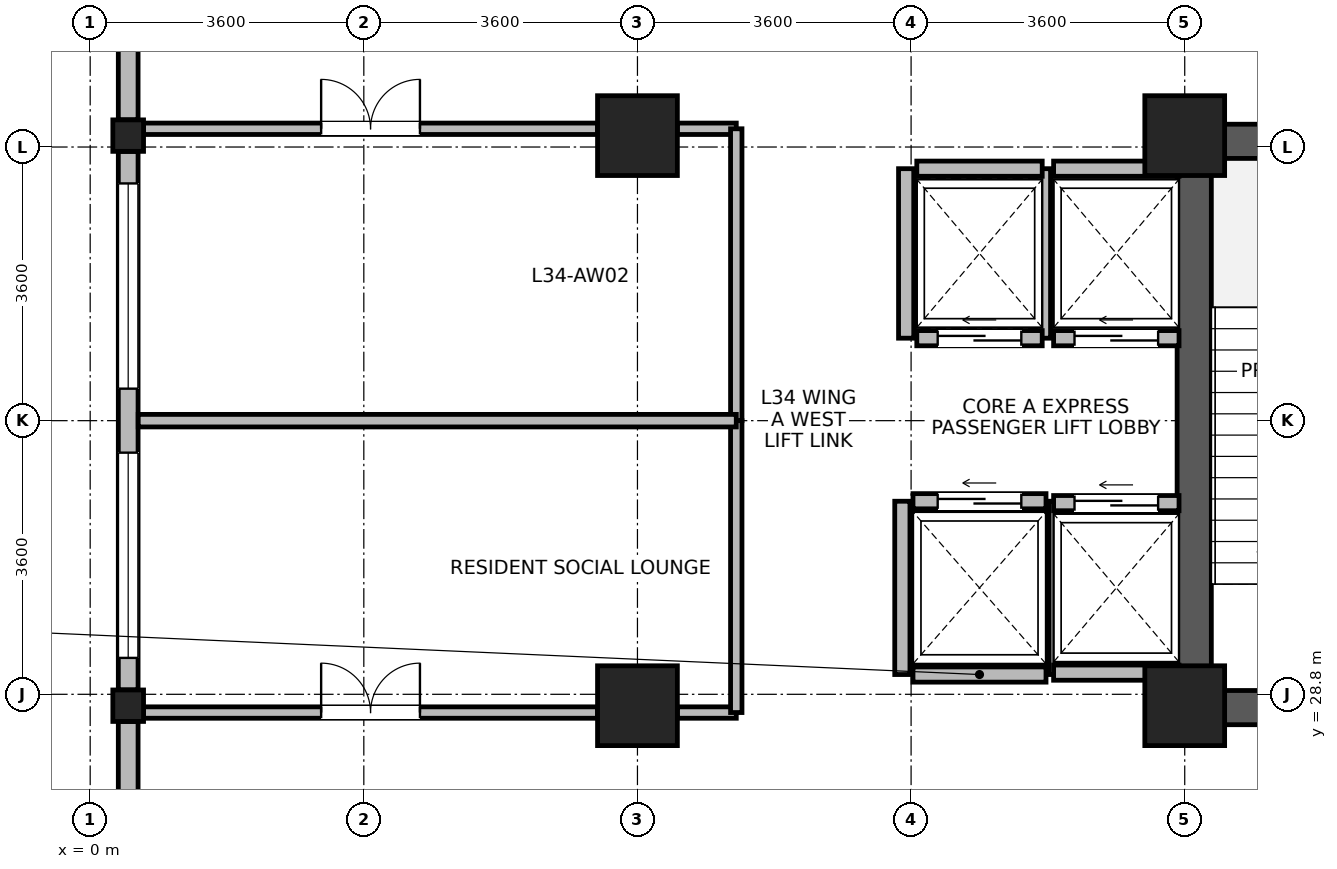
"""IFC4 building model, lengths in metres.
Left out: names, types, materials, properties, quantities, classifications, styles, units other than length and angle.
Written with IfcOpenShell. Run it as: python <this file> out.ifc"""

import sys

from ifc_helpers import new_model, si_unit, direction, frame, frame_2d, origin, origin_2d, place, context, subcontext, project, spatial, rectangle, i_section, extrude, source, transform, mapped, element, fill, save


model = new_model("IFC4")
c1 = context("Model", 3, precision=1e-05, world=origin(), true_north=direction((0.0, 1.0)))
c2 = subcontext(c1, "Body", "Model", "MODEL_VIEW")
j1 = project(units=[si_unit("LENGTHUNIT", "METRE"), si_unit("PLANEANGLEUNIT", "RADIAN")], contexts=[c1])
p1 = place(None, origin())
s1 = spatial("IfcSite", under=j1, at=p1, CompositionType="ELEMENT")
p2 = place(p1, origin())
s2 = spatial("IfcBuilding", under=s1, at=p2, CompositionType="ELEMENT")
p3 = place(p2, frame((0.0, 0.0, 135.6)))
s3 = spatial("IfcBuildingStorey", under=s2, at=p3, CompositionType="ELEMENT", Elevation=135.6)
p4 = place(p3, frame((14.525, 28.4, 0.0), z_axis=(0.0, 0.0, 1.0), x_axis=(0.0, 1.0, 0.0)))
e1 = element("IfcWall", 1, at=p4, inside=s3, PredefinedType="SHEAR", context=c2, shape_type="SweptSolid", body=[
    extrude(rectangle(XDim=7.9, YDim=0.45, at=frame_2d((3.95, 0.0))), origin(), (0.0, 0.0, 1.0), 4.36),
])
for number, where, z_axis, x_axis in (
    (2, (14.75, 28.625, 0.0), (0.0, 0.0, 1.0), (1.0, 0.0, 0.0)),
    (3, (14.75, 36.075, 0.0), (0.0, 0.0, 1.0), (1.0, 0.0, 0.0)),
):
    element("IfcWall", number, at=place(p3, frame(where, z_axis=z_axis, x_axis=x_axis)), inside=s3, PredefinedType="SHEAR", context=c2, shape_type="SweptSolid", body=[
        extrude(rectangle(XDim=3.2, YDim=0.45, at=frame_2d((1.6, 0.0))), origin(), (0.0, 0.0, 1.0), 4.36),
    ])
m1 = source(origin(), c2, "Body", "SweptSolid", [
    extrude(rectangle(XDim=1.05, YDim=1.05, at=origin_2d()), origin(), (0.0, 0.0, 1.0), 4.6),
])
for number, where, z_axis, x_axis in (
    (4, (7.2, 28.65, 0.0), (0.0, 0.0, 1.0), (1.0, 0.0, 0.0)),
    (5, (7.2, 36.15, 0.0), (0.0, 0.0, 1.0), (1.0, 0.0, 0.0)),
    (6, (14.4, 28.65, 0.0), (0.0, 0.0, 1.0), (1.0, 0.0, 0.0)),
    (7, (14.4, 36.15, 0.0), (0.0, 0.0, 1.0), (1.0, 0.0, 0.0)),
):
    element("IfcColumn", number, at=place(p3, frame(where, z_axis=z_axis, x_axis=x_axis)), inside=s3, PredefinedType="COLUMN", context=c2, shape_type="MappedRepresentation", body=[
        mapped(m1, transform((0.0, 0.0, 0.0), x_axis=(1.0, 0.0, 0.0), y_axis=(0.0, 1.0, 0.0), z_axis=(0.0, 0.0, 1.0), scale=1.0)),
    ])
m2 = source(origin(), c2, "Body", "SweptSolid", [
    extrude(i_section(OverallWidth=0.404, OverallDepth=0.414, WebThickness=0.021, FlangeThickness=0.028, FilletRadius=0.015, at=origin_2d()), origin(), (0.0, 0.0, 1.0), 4.6),
])
for number, where, z_axis, x_axis in (
    (8, (0.5, 28.65, 0.0), (0.0, 0.0, 1.0), (1.0, 0.0, 0.0)),
    (9, (0.5, 36.15, 0.0), (0.0, 0.0, 1.0), (1.0, 0.0, 0.0)),
):
    element("IfcColumn", number, at=place(p3, frame(where, z_axis=z_axis, x_axis=x_axis)), inside=s3, PredefinedType="COLUMN", context=c2, shape_type="MappedRepresentation", body=[
        mapped(m2, transform((0.0, 0.0, 0.0), x_axis=(1.0, 0.0, 0.0), y_axis=(0.0, 1.0, 0.0), z_axis=(0.0, 0.0, 1.0), scale=1.0)),
    ])
p5 = place(p3, frame((0.5, 36.358, 0.0), z_axis=(0.0, 0.0, 1.0), x_axis=(0.0, 1.0, 0.0)))
e10 = element("IfcWall", 10, at=p5, inside=s3, PredefinedType="STANDARD", context=c2, shape_type="SweptSolid", body=[
    extrude(rectangle(XDim=6.972, YDim=0.26, at=frame_2d((3.486, 0.0))), origin(), (0.0, 0.0, 1.0), 4.34),
])
p6 = place(p5, frame((3.879, 0.0, 0.85)))
e11 = element("IfcOpeningElement", 11, at=p6, cuts=e10, PredefinedType="OPENING", context=c2, shape_type="SweptSolid", body=[
    extrude(rectangle(XDim=2.7, YDim=2.05, at=frame_2d((1.35, 1.025))), frame((0.0, 0.14, 0.0), z_axis=(0.0, -1.0, 0.0), x_axis=(1.0, 0.0, 0.0)), (0.0, 0.0, 1.0), 0.28),
])
p7 = place(p5, frame((2.453, 0.0, 0.85)))
e12 = element("IfcOpeningElement", 12, at=p7, cuts=e10, PredefinedType="OPENING", context=c2, shape_type="SweptSolid", body=[
    extrude(rectangle(XDim=0.95, YDim=1.75, at=frame_2d((0.475, 0.875))), frame((0.0, 0.14, 0.0), z_axis=(0.0, -1.0, 0.0), x_axis=(1.0, 0.0, 0.0)), (0.0, 0.0, 1.0), 0.28),
])
p8 = place(p3, frame((0.5, 28.858, 0.0), z_axis=(0.0, 0.0, 1.0), x_axis=(0.0, 1.0, 0.0)))
e13 = element("IfcWall", 13, at=p8, inside=s3, PredefinedType="STANDARD", context=c2, shape_type="SweptSolid", body=[
    extrude(rectangle(XDim=7.084, YDim=0.26, at=frame_2d((3.542, 0.0))), origin(), (0.0, 0.0, 1.0), 3.89),
])
p9 = place(p8, frame((0.421, 0.0, 0.85)))
e14 = element("IfcOpeningElement", 14, at=p9, cuts=e13, PredefinedType="OPENING", context=c2, shape_type="SweptSolid", body=[
    extrude(rectangle(XDim=2.7, YDim=2.05, at=frame_2d((1.35, 1.025))), frame((0.0, 0.14, 0.0), z_axis=(0.0, -1.0, 0.0), x_axis=(1.0, 0.0, 0.0)), (0.0, 0.0, 1.0), 0.28),
])
p10 = place(p8, frame((3.963, 0.0, 0.85)))
e15 = element("IfcOpeningElement", 15, at=p10, cuts=e13, PredefinedType="OPENING", context=c2, shape_type="SweptSolid", body=[
    extrude(rectangle(XDim=2.7, YDim=2.05, at=frame_2d((1.35, 1.025))), frame((0.0, 0.14, 0.0), z_axis=(0.0, -1.0, 0.0), x_axis=(1.0, 0.0, 0.0)), (0.0, 0.0, 1.0), 0.28),
])
p11 = place(p3, frame((0.5, 21.47, 0.0), z_axis=(0.0, 0.0, 1.0), x_axis=(0.0, 1.0, 0.0)))
e16 = element("IfcWall", 16, at=p11, inside=s3, PredefinedType="STANDARD", context=c2, shape_type="SweptSolid", body=[
    extrude(rectangle(XDim=6.972, YDim=0.26, at=frame_2d((3.486, 0.0))), origin(), (0.0, 0.0, 1.0), 4.34),
])
p12 = place(p11, frame((0.393, 0.0, 0.85)))
e17 = element("IfcOpeningElement", 17, at=p12, cuts=e16, PredefinedType="OPENING", context=c2, shape_type="SweptSolid", body=[
    extrude(rectangle(XDim=2.7, YDim=2.05, at=frame_2d((1.35, 1.025))), frame((0.0, 0.14, 0.0), z_axis=(0.0, -1.0, 0.0), x_axis=(1.0, 0.0, 0.0)), (0.0, 0.0, 1.0), 0.28),
])
p13 = place(p11, frame((3.569, 0.0, 0.85)))
e18 = element("IfcOpeningElement", 18, at=p13, cuts=e16, PredefinedType="OPENING", context=c2, shape_type="SweptSolid", body=[
    extrude(rectangle(XDim=0.95, YDim=1.75, at=frame_2d((0.475, 0.875))), frame((0.0, 0.14, 0.0), z_axis=(0.0, -1.0, 0.0), x_axis=(1.0, 0.0, 0.0)), (0.0, 0.0, 1.0), 0.28),
])
p14 = place(p3, frame((10.825, 29.06, 0.0), z_axis=(0.0, 0.0, 1.0), x_axis=(1.0, 0.0, 0.0)))
e19 = element("IfcWall", 19, at=p14, inside=s3, PredefinedType="PARTITIONING", context=c2, shape_type="SweptSolid", body=[
    extrude(rectangle(XDim=1.75, YDim=0.2, at=frame_2d((0.875, 0.0))), origin(), (0.0, 0.0, 1.0), 4.34),
])
p15 = place(p3, frame((10.825, 31.34, 0.0), z_axis=(0.0, 0.0, 1.0), x_axis=(1.0, 0.0, 0.0)))
e20 = element("IfcWall", 20, at=p15, inside=s3, PredefinedType="PARTITIONING", context=c2, shape_type="SweptSolid", body=[
    extrude(rectangle(XDim=1.75, YDim=0.2, at=frame_2d((0.875, 0.0))), origin(), (0.0, 0.0, 1.0), 4.34),
])
p16 = place(p15, frame((0.325, 0.0, 0.0)))
e21 = element("IfcOpeningElement", 21, at=p16, cuts=e20, PredefinedType="OPENING", context=c2, shape_type="SweptSolid", body=[
    extrude(rectangle(XDim=1.1, YDim=2.12, at=frame_2d((0.55, 1.06))), frame((0.0, 0.11, 0.0), z_axis=(0.0, -1.0, 0.0), x_axis=(1.0, 0.0, 0.0)), (0.0, 0.0, 1.0), 0.22),
])
for number, where, z_axis, x_axis in (
    (22, (10.685, 29.06, 0.0), (0.0, 0.0, 1.0), (0.0, 1.0, 0.0)),
    (23, (12.715, 29.06, 0.0), (0.0, 0.0, 1.0), (0.0, 1.0, 0.0)),
):
    element("IfcWall", number, at=place(p3, frame(where, z_axis=z_axis, x_axis=x_axis)), inside=s3, PredefinedType="PARTITIONING", context=c2, shape_type="SweptSolid", body=[
        extrude(rectangle(XDim=2.28, YDim=0.2, at=frame_2d((1.14, 0.0))), origin(), (0.0, 0.0, 1.0), 4.34),
    ])
p17 = place(p3, frame((12.675, 33.485, 0.0), z_axis=(0.0, 0.0, 1.0), x_axis=(1.0, 0.0, 0.0)))
e24 = element("IfcWall", 24, at=p17, inside=s3, PredefinedType="PARTITIONING", context=c2, shape_type="SweptSolid", body=[
    extrude(rectangle(XDim=1.65, YDim=0.2, at=frame_2d((0.825, 0.0))), origin(), (0.0, 0.0, 1.0), 4.34),
])
p18 = place(p17, frame((0.275, 0.0, 0.0)))
e25 = element("IfcOpeningElement", 25, at=p18, cuts=e24, PredefinedType="OPENING", context=c2, shape_type="SweptSolid", body=[
    extrude(rectangle(XDim=1.1, YDim=2.12, at=frame_2d((0.55, 1.06))), frame((0.0, 0.11, 0.0), z_axis=(0.0, -1.0, 0.0), x_axis=(1.0, 0.0, 0.0)), (0.0, 0.0, 1.0), 0.22),
])
p19 = place(p3, frame((12.675, 35.715, 0.0), z_axis=(0.0, 0.0, 1.0), x_axis=(1.0, 0.0, 0.0)))
e26 = element("IfcWall", 26, at=p19, inside=s3, PredefinedType="PARTITIONING", context=c2, shape_type="SweptSolid", body=[
    extrude(rectangle(XDim=1.65, YDim=0.2, at=frame_2d((0.825, 0.0))), origin(), (0.0, 0.0, 1.0), 4.34),
])
p20 = place(p3, frame((12.535, 33.485, 0.0), z_axis=(0.0, 0.0, 1.0), x_axis=(0.0, 1.0, 0.0)))
e27 = element("IfcWall", 27, at=p20, inside=s3, PredefinedType="PARTITIONING", context=c2, shape_type="SweptSolid", body=[
    extrude(rectangle(XDim=2.23, YDim=0.2, at=frame_2d((1.115, 0.0))), origin(), (0.0, 0.0, 1.0), 4.34),
])
p21 = place(p3, frame((12.675, 29.085, 0.0), z_axis=(0.0, 0.0, 1.0), x_axis=(1.0, 0.0, 0.0)))
e28 = element("IfcWall", 28, at=p21, inside=s3, PredefinedType="PARTITIONING", context=c2, shape_type="SweptSolid", body=[
    extrude(rectangle(XDim=1.65, YDim=0.2, at=frame_2d((0.825, 0.0))), origin(), (0.0, 0.0, 1.0), 4.34),
])
p22 = place(p3, frame((12.675, 31.315, 0.0), z_axis=(0.0, 0.0, 1.0), x_axis=(1.0, 0.0, 0.0)))
e29 = element("IfcWall", 29, at=p22, inside=s3, PredefinedType="PARTITIONING", context=c2, shape_type="SweptSolid", body=[
    extrude(rectangle(XDim=1.65, YDim=0.2, at=frame_2d((0.825, 0.0))), origin(), (0.0, 0.0, 1.0), 4.34),
])
p23 = place(p22, frame((0.275, 0.0, 0.0)))
e30 = element("IfcOpeningElement", 30, at=p23, cuts=e29, PredefinedType="OPENING", context=c2, shape_type="SweptSolid", body=[
    extrude(rectangle(XDim=1.1, YDim=2.12, at=frame_2d((0.55, 1.06))), frame((0.0, 0.11, 0.0), z_axis=(0.0, -1.0, 0.0), x_axis=(1.0, 0.0, 0.0)), (0.0, 0.0, 1.0), 0.22),
])
p24 = place(p3, frame((10.875, 33.485, 0.0), z_axis=(0.0, 0.0, 1.0), x_axis=(1.0, 0.0, 0.0)))
e31 = element("IfcWall", 31, at=p24, inside=s3, PredefinedType="PARTITIONING", context=c2, shape_type="SweptSolid", body=[
    extrude(rectangle(XDim=1.65, YDim=0.2, at=frame_2d((0.825, 0.0))), origin(), (0.0, 0.0, 1.0), 4.34),
])
p25 = place(p24, frame((0.275, 0.0, 0.0)))
e32 = element("IfcOpeningElement", 32, at=p25, cuts=e31, PredefinedType="OPENING", context=c2, shape_type="SweptSolid", body=[
    extrude(rectangle(XDim=1.1, YDim=2.12, at=frame_2d((0.55, 1.06))), frame((0.0, 0.11, 0.0), z_axis=(0.0, -1.0, 0.0), x_axis=(1.0, 0.0, 0.0)), (0.0, 0.0, 1.0), 0.22),
])
p26 = place(p3, frame((10.875, 35.715, 0.0), z_axis=(0.0, 0.0, 1.0), x_axis=(1.0, 0.0, 0.0)))
e33 = element("IfcWall", 33, at=p26, inside=s3, PredefinedType="PARTITIONING", context=c2, shape_type="SweptSolid", body=[
    extrude(rectangle(XDim=1.65, YDim=0.2, at=frame_2d((0.825, 0.0))), origin(), (0.0, 0.0, 1.0), 4.34),
])
p27 = place(p3, frame((10.735, 33.485, 0.0), z_axis=(0.0, 0.0, 1.0), x_axis=(0.0, 1.0, 0.0)))
e34 = element("IfcWall", 34, at=p27, inside=s3, PredefinedType="PARTITIONING", context=c2, shape_type="SweptSolid", body=[
    extrude(rectangle(XDim=2.23, YDim=0.2, at=frame_2d((1.115, 0.0))), origin(), (0.0, 0.0, 1.0), 4.34),
])
p28 = place(p3, frame((0.702, 28.56, 0.0), z_axis=(0.0, 0.0, 1.0), x_axis=(1.0, 0.0, 0.0)))
e35 = element("IfcWall", 35, at=p28, inside=s3, PredefinedType="PARTITIONING", context=c2, shape_type="SweptSolid", body=[
    extrude(rectangle(XDim=5.973, YDim=0.15, at=frame_2d((2.987, 0.0))), origin(), (0.0, 0.0, 1.0), 3.74),
])
p29 = place(p28, frame((2.336, 0.0, 0.0)))
e36 = element("IfcOpeningElement", 36, at=p29, cuts=e35, PredefinedType="OPENING", context=c2, shape_type="SweptSolid", body=[
    extrude(rectangle(XDim=1.3, YDim=2.12, at=frame_2d((0.65, 1.06))), frame((0.0, 0.085, 0.0), z_axis=(0.0, -1.0, 0.0), x_axis=(1.0, 0.0, 0.0)), (0.0, 0.0, 1.0), 0.17),
])
p30 = place(p3, frame((7.725, 28.56, 0.0), z_axis=(0.0, 0.0, 1.0), x_axis=(1.0, 0.0, 0.0)))
e37 = element("IfcWall", 37, at=p30, inside=s3, PredefinedType="PARTITIONING", context=c2, shape_type="SweptSolid", body=[
    extrude(rectangle(XDim=0.775, YDim=0.15, at=frame_2d((0.387, 0.0))), origin(), (0.0, 0.0, 1.0), 3.74),
])
p31 = place(p3, frame((0.702, 36.24, 0.0), z_axis=(0.0, 0.0, 1.0), x_axis=(1.0, 0.0, 0.0)))
e38 = element("IfcWall", 38, at=p31, inside=s3, PredefinedType="PARTITIONING", context=c2, shape_type="SweptSolid", body=[
    extrude(rectangle(XDim=5.973, YDim=0.15, at=frame_2d((2.987, 0.0))), origin(), (0.0, 0.0, 1.0), 3.74),
])
p32 = place(p31, frame((2.336, 0.0, 0.0)))
e39 = element("IfcOpeningElement", 39, at=p32, cuts=e38, PredefinedType="OPENING", context=c2, shape_type="SweptSolid", body=[
    extrude(rectangle(XDim=1.3, YDim=2.12, at=frame_2d((0.65, 1.06))), frame((0.0, 0.085, 0.0), z_axis=(0.0, -1.0, 0.0), x_axis=(1.0, 0.0, 0.0)), (0.0, 0.0, 1.0), 0.17),
])
p33 = place(p3, frame((7.725, 36.24, 0.0), z_axis=(0.0, 0.0, 1.0), x_axis=(1.0, 0.0, 0.0)))
e40 = element("IfcWall", 40, at=p33, inside=s3, PredefinedType="PARTITIONING", context=c2, shape_type="SweptSolid", body=[
    extrude(rectangle(XDim=0.775, YDim=0.15, at=frame_2d((0.387, 0.0))), origin(), (0.0, 0.0, 1.0), 3.74),
])
p34 = place(p3, frame((8.5, 32.4, 0.0), z_axis=(0.0, 0.0, 1.0), x_axis=(0.0, 1.0, 0.0)))
e41 = element("IfcWall", 41, at=p34, inside=s3, PredefinedType="PARTITIONING", context=c2, shape_type="SweptSolid", body=[
    extrude(rectangle(XDim=3.84, YDim=0.15, at=frame_2d((1.92, 0.0))), origin(), (0.0, 0.0, 1.0), 4.34),
])
p35 = place(p3, frame((8.5, 28.56, 0.0), z_axis=(0.0, 0.0, 1.0), x_axis=(0.0, 1.0, 0.0)))
e42 = element("IfcWall", 42, at=p35, inside=s3, PredefinedType="PARTITIONING", context=c2, shape_type="SweptSolid", body=[
    extrude(rectangle(XDim=3.84, YDim=0.15, at=frame_2d((1.92, 0.0))), origin(), (0.0, 0.0, 1.0), 4.34),
])
p36 = place(p3, frame((0.632, 32.4, 0.0), z_axis=(0.0, 0.0, 1.0), x_axis=(1.0, 0.0, 0.0)))
e43 = element("IfcWall", 43, at=p36, inside=s3, PredefinedType="PARTITIONING", context=c2, shape_type="SweptSolid", body=[
    extrude(rectangle(XDim=7.868, YDim=0.165, at=frame_2d((3.934, 0.0))), origin(), (0.0, 0.0, 1.0), 4.34),
])
p37 = place(p9, origin())
e44 = element("IfcWindow", 44, at=p37, inside=s3, PartitioningType="SINGLE_PANEL", PredefinedType="WINDOW", context=c2, shape_type="SweptSolid", body=[
    extrude(rectangle(XDim=2.7, YDim=2.05, at=frame_2d((1.35, 1.025))), frame((0.0, 0.03, 0.0), z_axis=(0.0, -1.0, 0.0), x_axis=(1.0, 0.0, 0.0)), (0.0, 0.0, 1.0), 0.06),
])
fill(e14, e44)
p38 = place(p10, origin())
e45 = element("IfcWindow", 45, at=p38, inside=s3, PartitioningType="SINGLE_PANEL", PredefinedType="WINDOW", context=c2, shape_type="SweptSolid", body=[
    extrude(rectangle(XDim=2.7, YDim=2.05, at=frame_2d((1.35, 1.025))), frame((0.0, 0.03, 0.0), z_axis=(0.0, -1.0, 0.0), x_axis=(1.0, 0.0, 0.0)), (0.0, 0.0, 1.0), 0.06),
])
fill(e15, e45)
p39 = place(p16, origin())
e46 = element("IfcDoor", 46, at=p39, inside=s3, OperationType="SLIDING_TO_LEFT", PredefinedType="DOOR", context=c2, shape_type="SweptSolid", body=[
    extrude(rectangle(XDim=1.1, YDim=2.12, at=frame_2d((0.55, 1.06))), frame((0.0, 0.025, 0.0), z_axis=(0.0, -1.0, 0.0), x_axis=(1.0, 0.0, 0.0)), (0.0, 0.0, 1.0), 0.05),
])
fill(e21, e46)
p40 = place(p18, origin())
e47 = element("IfcDoor", 47, at=p40, inside=s3, OperationType="SLIDING_TO_LEFT", PredefinedType="DOOR", context=c2, shape_type="SweptSolid", body=[
    extrude(rectangle(XDim=1.1, YDim=2.12, at=frame_2d((0.55, 1.06))), frame((0.0, 0.025, 0.0), z_axis=(0.0, -1.0, 0.0), x_axis=(1.0, 0.0, 0.0)), (0.0, 0.0, 1.0), 0.05),
])
fill(e25, e47)
p41 = place(p23, origin())
e48 = element("IfcDoor", 48, at=p41, inside=s3, OperationType="SLIDING_TO_LEFT", PredefinedType="DOOR", context=c2, shape_type="SweptSolid", body=[
    extrude(rectangle(XDim=1.1, YDim=2.12, at=frame_2d((0.55, 1.06))), frame((0.0, 0.025, 0.0), z_axis=(0.0, -1.0, 0.0), x_axis=(1.0, 0.0, 0.0)), (0.0, 0.0, 1.0), 0.05),
])
fill(e30, e48)
p42 = place(p25, origin())
e49 = element("IfcDoor", 49, at=p42, inside=s3, OperationType="SLIDING_TO_LEFT", PredefinedType="DOOR", context=c2, shape_type="SweptSolid", body=[
    extrude(rectangle(XDim=1.1, YDim=2.12, at=frame_2d((0.55, 1.06))), frame((0.0, 0.025, 0.0), z_axis=(0.0, -1.0, 0.0), x_axis=(1.0, 0.0, 0.0)), (0.0, 0.0, 1.0), 0.05),
])
fill(e32, e49)
p43 = place(p29, origin())
e50 = element("IfcDoor", 50, at=p43, inside=s3, OperationType="DOUBLE_DOOR_SINGLE_SWING", PredefinedType="DOOR", context=c2, shape_type="SweptSolid", body=[
    extrude(rectangle(XDim=1.3, YDim=2.12, at=frame_2d((0.65, 1.06))), frame((0.0, 0.025, 0.0), z_axis=(0.0, -1.0, 0.0), x_axis=(1.0, 0.0, 0.0)), (0.0, 0.0, 1.0), 0.05),
])
fill(e36, e50)
p44 = place(p32, origin())
e51 = element("IfcDoor", 51, at=p44, inside=s3, OperationType="DOUBLE_DOOR_SINGLE_SWING", PredefinedType="DOOR", context=c2, shape_type="SweptSolid", body=[
    extrude(rectangle(XDim=1.3, YDim=2.12, at=frame_2d((0.65, 1.06))), frame((0.0, 0.025, 0.0), z_axis=(0.0, -1.0, 0.0), x_axis=(1.0, 0.0, 0.0)), (0.0, 0.0, 1.0), 0.05),
])
fill(e39, e51)
save(model, sys.argv[1])
